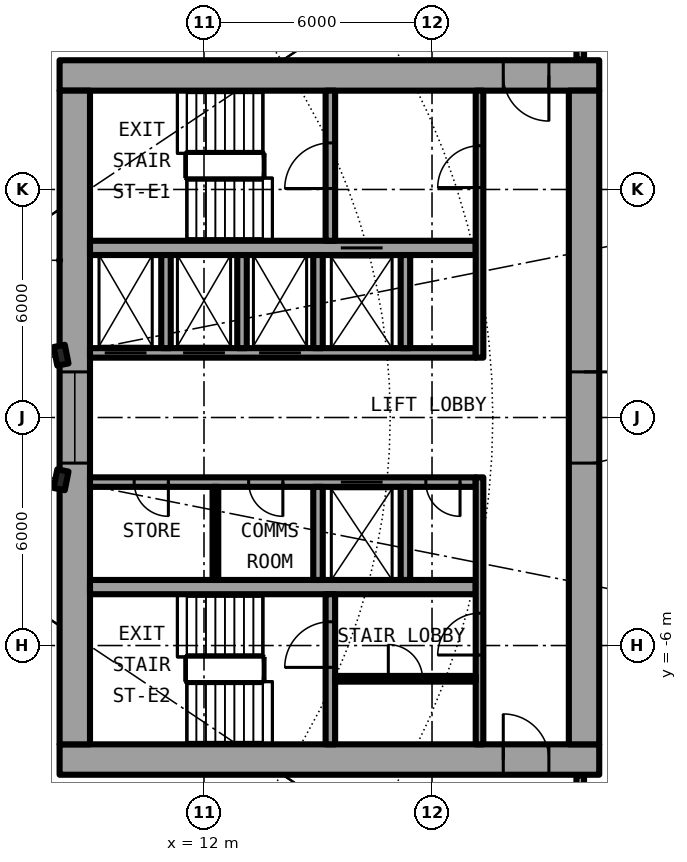
"""IFC4 building model, lengths in metres.
Left out: names, types, materials, properties, quantities, classifications, styles, units other than length and angle.
Written with IfcOpenShell. Run it as: python <this file> out.ifc"""

import sys

from ifc_helpers import new_model, si_unit, direction, frame, frame_2d, origin, origin_2d, place, context, subcontext, project, spatial, rectangle, i_section, extrude, element, fill, save


model = new_model("IFC4")
c1 = context("Model", 3, precision=1e-05, world=origin(), true_north=direction((0.0, 1.0)))
c2 = subcontext(c1, "Body", "Model", "MODEL_VIEW")
j1 = project(units=[si_unit("LENGTHUNIT", "METRE"), si_unit("PLANEANGLEUNIT", "RADIAN")], contexts=[c1])
p1 = place(None, origin())
s1 = spatial("IfcSite", under=j1, at=p1, CompositionType="ELEMENT")
p2 = place(p1, origin())
s2 = spatial("IfcBuilding", under=s1, at=p2, CompositionType="ELEMENT")
p3 = place(p2, frame((0.0, 0.0, 57.5)))
s3 = spatial("IfcBuildingStorey", under=s2, at=p3, CompositionType="ELEMENT", Elevation=57.5)
for number, where, z_axis, x_axis in (
    (1, (8.239, 1.639, 0.0), (0.0, 0.0, 1.0), (0.981, 0.195, 0.0)),
    (2, (8.239, -1.639, 0.0), (0.0, 0.0, 1.0), (0.981, -0.195, 0.0)),
):
    element("IfcColumn", number, at=place(p3, frame(where, z_axis=z_axis, x_axis=x_axis)), inside=s3, PredefinedType="COLUMN", context=c2, shape_type="SweptSolid", body=[
        extrude(i_section(OverallWidth=0.3, OverallDepth=0.5, WebThickness=0.014, FlangeThickness=0.028, FilletRadius=0.027, at=origin_2d()), origin(), (0.0, 0.0, 1.0), 6.1),
    ])
p4 = place(p3, frame((22.4, 9.0, 0.0), z_axis=(0.0, 0.0, 1.0), x_axis=(-1.0, 0.0, 0.0)))
e3 = element("IfcWall", 3, at=p4, inside=s3, PredefinedType="SHEAR", context=c2, shape_type="SweptSolid", body=[
    extrude(rectangle(XDim=14.2, YDim=0.8, at=frame_2d((7.1, 0.0))), origin(), (0.0, 0.0, 1.0), 6.1),
])
p5 = place(p4, frame((1.325, 0.0, 0.0)))
e4 = element("IfcOpeningElement", 4, at=p5, cuts=e3, PredefinedType="OPENING", context=c2, shape_type="SweptSolid", body=[
    extrude(rectangle(XDim=1.2, YDim=2.3, at=frame_2d((0.6, 1.15))), frame((0.0, 0.41, 0.0), z_axis=(0.0, -1.0, 0.0), x_axis=(1.0, 0.0, 0.0)), (0.0, 0.0, 1.0), 0.82),
])
p6 = place(p3, frame((8.2, -9.0, 0.0), z_axis=(0.0, 0.0, 1.0), x_axis=(1.0, 0.0, 0.0)))
e5 = element("IfcWall", 5, at=p6, inside=s3, PredefinedType="SHEAR", context=c2, shape_type="SweptSolid", body=[
    extrude(rectangle(XDim=14.2, YDim=0.8, at=frame_2d((7.1, 0.0))), origin(), (0.0, 0.0, 1.0), 6.1),
])
p7 = place(p6, frame((11.675, 0.0, 0.0)))
e6 = element("IfcOpeningElement", 6, at=p7, cuts=e5, PredefinedType="OPENING", context=c2, shape_type="SweptSolid", body=[
    extrude(rectangle(XDim=1.2, YDim=2.3, at=frame_2d((0.6, 1.15))), frame((0.0, 0.41, 0.0), z_axis=(0.0, -1.0, 0.0), x_axis=(1.0, 0.0, 0.0)), (0.0, 0.0, 1.0), 0.82),
])
p8 = place(p3, frame((22.0, 8.6, 0.0), z_axis=(0.0, 0.0, 1.0), x_axis=(0.0, -1.0, 0.0)))
e7 = element("IfcWall", 7, at=p8, inside=s3, PredefinedType="SHEAR", context=c2, shape_type="SweptSolid", body=[
    extrude(rectangle(XDim=17.2, YDim=0.8, at=frame_2d((8.6, 0.0))), origin(), (0.0, 0.0, 1.0), 6.1),
])
p9 = place(p8, frame((7.4, 0.0, 0.0)))
e8 = element("IfcOpeningElement", 8, at=p9, cuts=e7, PredefinedType="OPENING", context=c2, shape_type="SweptSolid", body=[
    extrude(rectangle(XDim=2.4, YDim=2.3, at=frame_2d((1.2, 1.15))), frame((0.0, 0.41, 0.0), z_axis=(0.0, -1.0, 0.0), x_axis=(1.0, 0.0, 0.0)), (0.0, 0.0, 1.0), 0.82),
])
p10 = place(p3, frame((8.6, -8.6, 0.0), z_axis=(0.0, 0.0, 1.0), x_axis=(0.0, 1.0, 0.0)))
e9 = element("IfcWall", 9, at=p10, inside=s3, PredefinedType="SHEAR", context=c2, shape_type="SweptSolid", body=[
    extrude(rectangle(XDim=17.2, YDim=0.8, at=frame_2d((8.6, 0.0))), origin(), (0.0, 0.0, 1.0), 6.1),
])
p11 = place(p10, frame((7.4, 0.0, 0.1)))
e10 = element("IfcOpeningElement", 10, at=p11, cuts=e9, PredefinedType="OPENING", context=c2, shape_type="SweptSolid", body=[
    extrude(rectangle(XDim=2.4, YDim=2.2, at=frame_2d((1.2, 1.1))), frame((0.0, 0.41, 0.0), z_axis=(0.0, -1.0, 0.0), x_axis=(1.0, 0.0, 0.0)), (0.0, 0.0, 1.0), 0.82),
])
p12 = place(p3, frame((9.0, 1.7, 0.0), z_axis=(0.0, 0.0, 1.0), x_axis=(1.0, 0.0, 0.0)))
e11 = element("IfcWall", 11, at=p12, inside=s3, PredefinedType="SHEAR", context=c2, shape_type="SweptSolid", body=[
    extrude(rectangle(XDim=10.15, YDim=0.25, at=frame_2d((5.075, 0.0))), origin(), (0.0, 0.0, 1.0), 6.1),
])
p13 = place(p12, frame((0.387, 0.0, 0.0)))
e12 = element("IfcOpeningElement", 12, at=p13, cuts=e11, PredefinedType="OPENING", context=c2, shape_type="SweptSolid", body=[
    extrude(rectangle(XDim=1.1, YDim=2.3, at=frame_2d((0.55, 1.15))), frame((0.0, 0.135, 0.0), z_axis=(0.0, -1.0, 0.0), x_axis=(1.0, 0.0, 0.0)), (0.0, 0.0, 1.0), 0.27),
])
p14 = place(p12, frame((2.45, 0.0, 0.0)))
e13 = element("IfcOpeningElement", 13, at=p14, cuts=e11, PredefinedType="OPENING", context=c2, shape_type="SweptSolid", body=[
    extrude(rectangle(XDim=1.1, YDim=2.3, at=frame_2d((0.55, 1.15))), frame((0.0, 0.135, 0.0), z_axis=(0.0, -1.0, 0.0), x_axis=(1.0, 0.0, 0.0)), (0.0, 0.0, 1.0), 0.27),
])
p15 = place(p12, frame((4.45, 0.0, 0.0)))
e14 = element("IfcOpeningElement", 14, at=p15, cuts=e11, PredefinedType="OPENING", context=c2, shape_type="SweptSolid", body=[
    extrude(rectangle(XDim=1.1, YDim=2.3, at=frame_2d((0.55, 1.15))), frame((0.0, 0.135, 0.0), z_axis=(0.0, -1.0, 0.0), x_axis=(1.0, 0.0, 0.0)), (0.0, 0.0, 1.0), 0.27),
])
p16 = place(p3, frame((9.0, 4.462, 0.0), z_axis=(0.0, 0.0, 1.0), x_axis=(1.0, 0.0, 0.0)))
e15 = element("IfcWall", 15, at=p16, inside=s3, PredefinedType="SHEAR", context=c2, shape_type="SweptSolid", body=[
    extrude(rectangle(XDim=10.15, YDim=0.375, at=frame_2d((5.075, 0.0))), origin(), (0.0, 0.0, 1.0), 6.1),
])
p17 = place(p16, frame((6.6, 0.0, 0.0)))
e16 = element("IfcOpeningElement", 16, at=p17, cuts=e15, PredefinedType="OPENING", context=c2, shape_type="SweptSolid", body=[
    extrude(rectangle(XDim=1.1, YDim=2.3, at=frame_2d((0.55, 1.15))), frame((0.0, 0.198, 0.0), z_axis=(0.0, -1.0, 0.0), x_axis=(1.0, 0.0, 0.0)), (0.0, 0.0, 1.0), 0.395),
])
p18 = place(p3, frame((15.325, 4.65, 0.0), z_axis=(0.0, 0.0, 1.0), x_axis=(0.0, 1.0, 0.0)))
e17 = element("IfcWall", 17, at=p18, inside=s3, PredefinedType="SHEAR", context=c2, shape_type="SweptSolid", body=[
    extrude(rectangle(XDim=3.95, YDim=0.25, at=frame_2d((1.975, 0.0))), origin(), (0.0, 0.0, 1.0), 6.1),
])
p19 = place(p18, frame((1.375, 0.0, 0.0)))
e18 = element("IfcOpeningElement", 18, at=p19, cuts=e17, PredefinedType="OPENING", context=c2, shape_type="SweptSolid", body=[
    extrude(rectangle(XDim=1.2, YDim=2.3, at=frame_2d((0.6, 1.15))), frame((0.0, 0.135, 0.0), z_axis=(0.0, -1.0, 0.0), x_axis=(1.0, 0.0, 0.0)), (0.0, 0.0, 1.0), 0.27),
])
for number, where, z_axis, x_axis in (
    (19, (15.0, 1.825, 0.0), (0.0, 0.0, 1.0), (0.0, 1.0, 0.0)),
    (20, (17.3, 1.825, 0.0), (0.0, 0.0, 1.0), (0.0, 1.0, 0.0)),
):
    element("IfcWall", number, at=place(p3, frame(where, z_axis=z_axis, x_axis=x_axis)), inside=s3, PredefinedType="SOLIDWALL", context=c2, shape_type="SweptSolid", body=[
        extrude(rectangle(XDim=2.45, YDim=0.25, at=frame_2d((1.225, 0.0))), origin(), (0.0, 0.0, 1.0), 5.75),
    ])
p20 = place(p3, frame((19.25, 1.575, 0.0), z_axis=(0.0, 0.0, 1.0), x_axis=(0.0, 1.0, 0.0)))
e21 = element("IfcWall", 21, at=p20, inside=s3, PredefinedType="SOLIDWALL", context=c2, shape_type="SweptSolid", body=[
    extrude(rectangle(XDim=7.025, YDim=0.2, at=frame_2d((3.513, 0.0))), origin(), (0.0, 0.0, 1.0), 5.75),
])
p21 = place(p20, frame((4.475, 0.0, 0.0)))
e22 = element("IfcOpeningElement", 22, at=p21, cuts=e21, PredefinedType="OPENING", context=c2, shape_type="SweptSolid", body=[
    extrude(rectangle(XDim=1.1, YDim=2.3, at=frame_2d((0.55, 1.15))), frame((0.0, 0.11, 0.0), z_axis=(0.0, -1.0, 0.0), x_axis=(1.0, 0.0, 0.0)), (0.0, 0.0, 1.0), 0.22),
])
p22 = place(p3, frame((19.15, -1.7, 0.0), z_axis=(0.0, 0.0, 1.0), x_axis=(-1.0, 0.0, 0.0)))
e23 = element("IfcWall", 23, at=p22, inside=s3, PredefinedType="SHEAR", context=c2, shape_type="SweptSolid", body=[
    extrude(rectangle(XDim=10.15, YDim=0.25, at=frame_2d((5.075, 0.0))), origin(), (0.0, 0.0, 1.0), 6.1),
])
p23 = place(p22, frame((2.45, 0.0, 0.0)))
e24 = element("IfcOpeningElement", 24, at=p23, cuts=e23, PredefinedType="OPENING", context=c2, shape_type="SweptSolid", body=[
    extrude(rectangle(XDim=1.1, YDim=2.3, at=frame_2d((0.55, 1.15))), frame((0.0, 0.135, 0.0), z_axis=(0.0, -1.0, 0.0), x_axis=(1.0, 0.0, 0.0)), (0.0, 0.0, 1.0), 0.27),
])
p24 = place(p22, frame((8.087, 0.0, 0.0)))
e25 = element("IfcOpeningElement", 25, at=p24, cuts=e23, PredefinedType="OPENING", context=c2, shape_type="SweptSolid", body=[
    extrude(rectangle(XDim=0.9, YDim=2.3, at=frame_2d((0.45, 1.15))), frame((0.0, 0.135, 0.0), z_axis=(0.0, -1.0, 0.0), x_axis=(1.0, 0.0, 0.0)), (0.0, 0.0, 1.0), 0.27),
])
p25 = place(p22, frame((5.075, 0.0, 0.0)))
e26 = element("IfcOpeningElement", 26, at=p25, cuts=e23, PredefinedType="OPENING", context=c2, shape_type="SweptSolid", body=[
    extrude(rectangle(XDim=0.9, YDim=2.3, at=frame_2d((0.45, 1.15))), frame((0.0, 0.135, 0.0), z_axis=(0.0, -1.0, 0.0), x_axis=(1.0, 0.0, 0.0)), (0.0, 0.0, 1.0), 0.27),
])
p26 = place(p22, frame((0.413, 0.0, 0.0)))
e27 = element("IfcOpeningElement", 27, at=p26, cuts=e23, PredefinedType="OPENING", context=c2, shape_type="SweptSolid", body=[
    extrude(rectangle(XDim=0.9, YDim=2.3, at=frame_2d((0.45, 1.15))), frame((0.0, 0.135, 0.0), z_axis=(0.0, -1.0, 0.0), x_axis=(1.0, 0.0, 0.0)), (0.0, 0.0, 1.0), 0.27),
])
p27 = place(p3, frame((9.0, -4.462, 0.0), z_axis=(0.0, 0.0, 1.0), x_axis=(1.0, 0.0, 0.0)))
e28 = element("IfcWall", 28, at=p27, inside=s3, PredefinedType="SHEAR", context=c2, shape_type="SweptSolid", body=[
    extrude(rectangle(XDim=10.15, YDim=0.375, at=frame_2d((5.075, 0.0))), origin(), (0.0, 0.0, 1.0), 6.1),
])
p28 = place(p3, frame((15.325, -8.6, 0.0), z_axis=(0.0, 0.0, 1.0), x_axis=(0.0, 1.0, 0.0)))
e29 = element("IfcWall", 29, at=p28, inside=s3, PredefinedType="SHEAR", context=c2, shape_type="SweptSolid", body=[
    extrude(rectangle(XDim=3.95, YDim=0.25, at=frame_2d((1.975, 0.0))), origin(), (0.0, 0.0, 1.0), 6.1),
])
p29 = place(p28, frame((2.025, 0.0, 0.0)))
e30 = element("IfcOpeningElement", 30, at=p29, cuts=e29, PredefinedType="OPENING", context=c2, shape_type="SweptSolid", body=[
    extrude(rectangle(XDim=1.2, YDim=2.3, at=frame_2d((0.6, 1.15))), frame((0.0, 0.135, 0.0), z_axis=(0.0, -1.0, 0.0), x_axis=(1.0, 0.0, 0.0)), (0.0, 0.0, 1.0), 0.27),
])
for number, where, z_axis, x_axis in (
    (31, (15.0, -1.825, 0.0), (0.0, 0.0, 1.0), (0.0, -1.0, 0.0)),
    (32, (17.3, -1.825, 0.0), (0.0, 0.0, 1.0), (0.0, -1.0, 0.0)),
):
    element("IfcWall", number, at=place(p3, frame(where, z_axis=z_axis, x_axis=x_axis)), inside=s3, PredefinedType="SOLIDWALL", context=c2, shape_type="SweptSolid", body=[
        extrude(rectangle(XDim=2.45, YDim=0.25, at=frame_2d((1.225, 0.0))), origin(), (0.0, 0.0, 1.0), 5.75),
    ])
p30 = place(p3, frame((19.25, -8.6, 0.0), z_axis=(0.0, 0.0, 1.0), x_axis=(0.0, 1.0, 0.0)))
e33 = element("IfcWall", 33, at=p30, inside=s3, PredefinedType="SOLIDWALL", context=c2, shape_type="SweptSolid", body=[
    extrude(rectangle(XDim=7.025, YDim=0.2, at=frame_2d((3.513, 0.0))), origin(), (0.0, 0.0, 1.0), 5.75),
])
p31 = place(p30, frame((2.35, 0.0, 0.0)))
e34 = element("IfcOpeningElement", 34, at=p31, cuts=e33, PredefinedType="OPENING", context=c2, shape_type="SweptSolid", body=[
    extrude(rectangle(XDim=1.1, YDim=2.3, at=frame_2d((0.55, 1.15))), frame((0.0, 0.11, 0.0), z_axis=(0.0, -1.0, 0.0), x_axis=(1.0, 0.0, 0.0)), (0.0, 0.0, 1.0), 0.22),
])
for number, where, z_axis, x_axis in (
    (35, (11.0, 1.825, 0.0), (0.0, 0.0, 1.0), (0.0, 1.0, 0.0)),
    (36, (13.0, 1.825, 0.0), (0.0, 0.0, 1.0), (0.0, 1.0, 0.0)),
):
    element("IfcWall", number, at=place(p3, frame(where, z_axis=z_axis, x_axis=x_axis)), inside=s3, PredefinedType="SOLIDWALL", context=c2, shape_type="SweptSolid", body=[
        extrude(rectangle(XDim=2.45, YDim=0.25, at=frame_2d((1.225, 0.0))), origin(), (0.0, 0.0, 1.0), 5.75),
    ])
p32 = place(p3, frame((12.3, -1.825, 0.0), z_axis=(0.0, 0.0, 1.0), x_axis=(0.0, -1.0, 0.0)))
e37 = element("IfcWall", 37, at=p32, inside=s3, PredefinedType="PARTITIONING", context=c2, shape_type="SweptSolid", body=[
    extrude(rectangle(XDim=2.45, YDim=0.15, at=frame_2d((1.225, 0.0))), origin(), (0.0, 0.0, 1.0), 5.75),
])
p33 = place(p3, frame((15.45, -6.875, 0.0), z_axis=(0.0, 0.0, 1.0), x_axis=(1.0, 0.0, 0.0)))
e38 = element("IfcWall", 38, at=p33, inside=s3, PredefinedType="PARTITIONING", context=c2, shape_type="SweptSolid", body=[
    extrude(rectangle(XDim=3.7, YDim=0.15, at=frame_2d((1.85, 0.0))), origin(), (0.0, 0.0, 1.0), 5.75),
])
p34 = place(p33, frame((1.4, 0.0, 0.0)))
e39 = element("IfcOpeningElement", 39, at=p34, cuts=e38, PredefinedType="OPENING", context=c2, shape_type="SweptSolid", body=[
    extrude(rectangle(XDim=0.9, YDim=2.3, at=frame_2d((0.45, 1.15))), frame((0.0, 0.085, 0.0), z_axis=(0.0, -1.0, 0.0), x_axis=(1.0, 0.0, 0.0)), (0.0, 0.0, 1.0), 0.17),
])
for number, where, z_axis, x_axis in (
    (40, (21.9, -12.82, 0.0), (0.0, 0.0, 1.0), (0.0, 1.0, 0.0)),
    (41, (21.9, 9.42, 0.0), (0.0, 0.0, 1.0), (0.0, 1.0, 0.0)),
):
    element("IfcWall", number, at=place(p3, frame(where, z_axis=z_axis, x_axis=x_axis)), inside=s3, PredefinedType="PARTITIONING", context=c2, shape_type="SweptSolid", body=[
        extrude(rectangle(XDim=3.4, YDim=0.2, at=frame_2d((1.7, 0.0))), origin(), (0.0, 0.0, 1.0), 5.75),
    ])
p35 = place(p3, frame((3.757, -9.072, 0.0), z_axis=(0.0, 0.0, 1.0), x_axis=(0.382668905709, -0.923885549516, 0.0)))
e42 = element("IfcWall", 42, at=p35, inside=s3, PredefinedType="PARTITIONING", context=c2, shape_type="SweptSolid", body=[
    extrude(rectangle(XDim=17.339, YDim=0.15, at=frame_2d((8.669, 0.0))), origin(), (0.0, 0.0, 1.0), 5.75),
])
p36 = place(p13, origin())
e43 = element("IfcDoor", 43, at=p36, inside=s3, OperationType="DOUBLE_DOOR_SLIDING", PredefinedType="DOOR", context=c2, shape_type="SweptSolid", body=[
    extrude(rectangle(XDim=1.1, YDim=2.3, at=frame_2d((0.55, 1.15))), frame((0.0, 0.025, 0.0), z_axis=(0.0, -1.0, 0.0), x_axis=(1.0, 0.0, 0.0)), (0.0, 0.0, 1.0), 0.05),
])
fill(e12, e43)
p37 = place(p14, origin())
e44 = element("IfcDoor", 44, at=p37, inside=s3, OperationType="DOUBLE_DOOR_SLIDING", PredefinedType="DOOR", context=c2, shape_type="SweptSolid", body=[
    extrude(rectangle(XDim=1.1, YDim=2.3, at=frame_2d((0.55, 1.15))), frame((0.0, 0.025, 0.0), z_axis=(0.0, -1.0, 0.0), x_axis=(1.0, 0.0, 0.0)), (0.0, 0.0, 1.0), 0.05),
])
fill(e13, e44)
p38 = place(p15, origin())
e45 = element("IfcDoor", 45, at=p38, inside=s3, OperationType="DOUBLE_DOOR_SLIDING", PredefinedType="DOOR", context=c2, shape_type="SweptSolid", body=[
    extrude(rectangle(XDim=1.1, YDim=2.3, at=frame_2d((0.55, 1.15))), frame((0.0, 0.025, 0.0), z_axis=(0.0, -1.0, 0.0), x_axis=(1.0, 0.0, 0.0)), (0.0, 0.0, 1.0), 0.05),
])
fill(e14, e45)
p39 = place(p17, origin())
e46 = element("IfcDoor", 46, at=p39, inside=s3, OperationType="DOUBLE_DOOR_SLIDING", PredefinedType="DOOR", context=c2, shape_type="SweptSolid", body=[
    extrude(rectangle(XDim=1.1, YDim=2.3, at=frame_2d((0.55, 1.15))), frame((0.0, 0.025, 0.0), z_axis=(0.0, -1.0, 0.0), x_axis=(1.0, 0.0, 0.0)), (0.0, 0.0, 1.0), 0.05),
])
fill(e16, e46)
p40 = place(p23, origin())
e47 = element("IfcDoor", 47, at=p40, inside=s3, OperationType="DOUBLE_DOOR_SLIDING", PredefinedType="DOOR", context=c2, shape_type="SweptSolid", body=[
    extrude(rectangle(XDim=1.1, YDim=2.3, at=frame_2d((0.55, 1.15))), frame((0.0, 0.025, 0.0), z_axis=(0.0, -1.0, 0.0), x_axis=(1.0, 0.0, 0.0)), (0.0, 0.0, 1.0), 0.05),
])
fill(e24, e47)
p41 = place(p24, origin())
e48 = element("IfcDoor", 48, at=p41, inside=s3, OperationType="SINGLE_SWING_LEFT", PredefinedType="DOOR", context=c2, shape_type="SweptSolid", body=[
    extrude(rectangle(XDim=0.9, YDim=2.3, at=frame_2d((0.45, 1.15))), frame((0.0, 0.025, 0.0), z_axis=(0.0, -1.0, 0.0), x_axis=(1.0, 0.0, 0.0)), (0.0, 0.0, 1.0), 0.05),
])
fill(e25, e48)
p42 = place(p25, origin())
e49 = element("IfcDoor", 49, at=p42, inside=s3, OperationType="SINGLE_SWING_LEFT", PredefinedType="DOOR", context=c2, shape_type="SweptSolid", body=[
    extrude(rectangle(XDim=0.9, YDim=2.3, at=frame_2d((0.45, 1.15))), frame((0.0, 0.025, 0.0), z_axis=(0.0, -1.0, 0.0), x_axis=(1.0, 0.0, 0.0)), (0.0, 0.0, 1.0), 0.05),
])
fill(e26, e49)
p43 = place(p26, origin())
e50 = element("IfcDoor", 50, at=p43, inside=s3, OperationType="SINGLE_SWING_RIGHT", PredefinedType="DOOR", context=c2, shape_type="SweptSolid", body=[
    extrude(rectangle(XDim=0.9, YDim=2.3, at=frame_2d((0.45, 1.15))), frame((0.0, 0.025, 0.0), z_axis=(0.0, -1.0, 0.0), x_axis=(1.0, 0.0, 0.0)), (0.0, 0.0, 1.0), 0.05),
])
fill(e27, e50)
p44 = place(p34, origin())
e51 = element("IfcDoor", 51, at=p44, inside=s3, OperationType="SINGLE_SWING_LEFT", PredefinedType="DOOR", context=c2, shape_type="SweptSolid", body=[
    extrude(rectangle(XDim=0.9, YDim=2.3, at=frame_2d((0.45, 1.15))), frame((0.0, 0.025, 0.0), z_axis=(0.0, -1.0, 0.0), x_axis=(1.0, 0.0, 0.0)), (0.0, 0.0, 1.0), 0.05),
])
fill(e39, e51)
p45 = place(p19, origin())
e52 = element("IfcDoor", 52, at=p45, inside=s3, OperationType="SINGLE_SWING_LEFT", PredefinedType="DOOR", context=c2, shape_type="SweptSolid", body=[
    extrude(rectangle(XDim=1.2, YDim=2.3, at=frame_2d((0.6, 1.15))), frame((0.0, 0.025, 0.0), z_axis=(0.0, -1.0, 0.0), x_axis=(1.0, 0.0, 0.0)), (0.0, 0.0, 1.0), 0.05),
])
fill(e18, e52)
p46 = place(p29, origin())
e53 = element("IfcDoor", 53, at=p46, inside=s3, OperationType="SINGLE_SWING_LEFT", PredefinedType="DOOR", context=c2, shape_type="SweptSolid", body=[
    extrude(rectangle(XDim=1.2, YDim=2.3, at=frame_2d((0.6, 1.15))), frame((0.0, 0.025, 0.0), z_axis=(0.0, -1.0, 0.0), x_axis=(1.0, 0.0, 0.0)), (0.0, 0.0, 1.0), 0.05),
])
fill(e30, e53)
p47 = place(p21, origin())
e54 = element("IfcDoor", 54, at=p47, inside=s3, OperationType="SINGLE_SWING_LEFT", PredefinedType="DOOR", context=c2, shape_type="SweptSolid", body=[
    extrude(rectangle(XDim=1.1, YDim=2.3, at=frame_2d((0.55, 1.15))), frame((0.0, 0.025, 0.0), z_axis=(0.0, -1.0, 0.0), x_axis=(1.0, 0.0, 0.0)), (0.0, 0.0, 1.0), 0.05),
])
fill(e22, e54)
p48 = place(p31, origin())
e55 = element("IfcDoor", 55, at=p48, inside=s3, OperationType="SINGLE_SWING_RIGHT", PredefinedType="DOOR", context=c2, shape_type="SweptSolid", body=[
    extrude(rectangle(XDim=1.1, YDim=2.3, at=frame_2d((0.55, 1.15))), frame((0.0, 0.025, 0.0), z_axis=(0.0, -1.0, 0.0), x_axis=(1.0, 0.0, 0.0)), (0.0, 0.0, 1.0), 0.05),
])
fill(e34, e55)
p49 = place(p5, origin())
e56 = element("IfcDoor", 56, at=p49, inside=s3, OperationType="SINGLE_SWING_RIGHT", PredefinedType="DOOR", context=c2, shape_type="SweptSolid", body=[
    extrude(rectangle(XDim=1.2, YDim=2.3, at=frame_2d((0.6, 1.15))), frame((0.0, 0.025, 0.0), z_axis=(0.0, -1.0, 0.0), x_axis=(1.0, 0.0, 0.0)), (0.0, 0.0, 1.0), 0.05),
])
fill(e4, e56)
p50 = place(p7, origin())
e57 = element("IfcDoor", 57, at=p50, inside=s3, OperationType="SINGLE_SWING_LEFT", PredefinedType="DOOR", context=c2, shape_type="SweptSolid", body=[
    extrude(rectangle(XDim=1.2, YDim=2.3, at=frame_2d((0.6, 1.15))), frame((0.0, 0.025, 0.0), z_axis=(0.0, -1.0, 0.0), x_axis=(1.0, 0.0, 0.0)), (0.0, 0.0, 1.0), 0.05),
])
fill(e6, e57)
p51 = place(p9, origin())
e58 = element("IfcDoor", 58, at=p51, inside=s3, OperationType="SINGLE_SWING_LEFT", PredefinedType="DOOR", context=c2, shape_type="SweptSolid", body=[
    extrude(rectangle(XDim=2.4, YDim=2.3, at=frame_2d((1.2, 1.15))), frame((0.0, 0.025, 0.0), z_axis=(0.0, -1.0, 0.0), x_axis=(1.0, 0.0, 0.0)), (0.0, 0.0, 1.0), 0.05),
])
fill(e8, e58)
p52 = place(p11, origin())
e59 = element("IfcWindow", 59, at=p52, inside=s3, PartitioningType="SINGLE_PANEL", PredefinedType="WINDOW", context=c2, shape_type="SweptSolid", body=[
    extrude(rectangle(XDim=2.4, YDim=2.2, at=frame_2d((1.2, 1.1))), frame((0.0, 0.03, 0.0), z_axis=(0.0, -1.0, 0.0), x_axis=(1.0, 0.0, 0.0)), (0.0, 0.0, 1.0), 0.06),
])
fill(e10, e59)
save(model, sys.argv[1])
